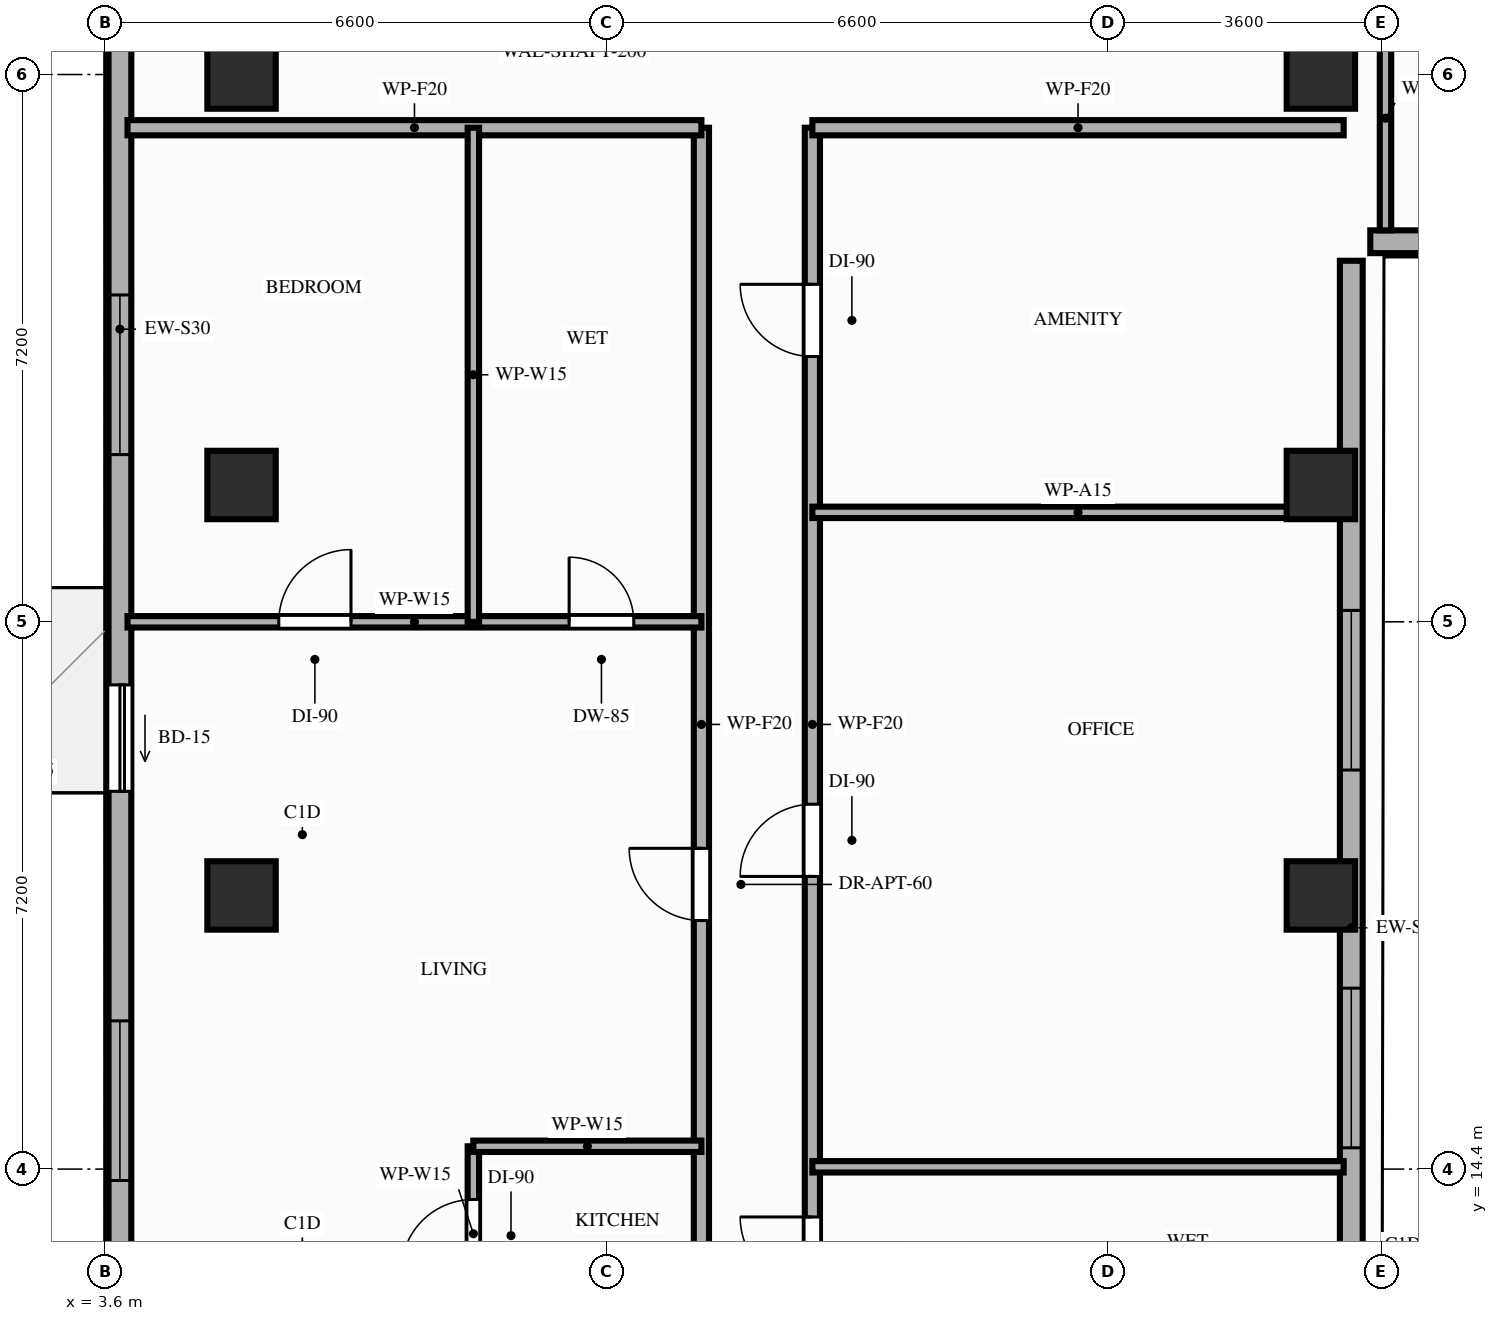
"""IFC4 building model, lengths in metres.
Left out: names, types, materials, properties, quantities, classifications, styles, units other than length and angle.
Written with IfcOpenShell. Run it as: python <this file> out.ifc"""

import sys

from ifc_helpers import new_model, si_unit, direction, frame, frame_2d, origin, origin_2d, place, context, subcontext, project, spatial, rectangle, extrude, element, fill, save


model = new_model("IFC4")
c1 = context("Model", 3, precision=1e-05, world=origin(), true_north=direction((0.0, 1.0)))
c2 = subcontext(c1, "Body", "Model", "MODEL_VIEW")
j1 = project(units=[si_unit("LENGTHUNIT", "METRE"), si_unit("PLANEANGLEUNIT", "RADIAN")], contexts=[c1])
p1 = place(None, origin())
s1 = spatial("IfcSite", under=j1, at=p1, CompositionType="ELEMENT")
p2 = place(p1, origin())
s2 = spatial("IfcBuilding", under=s1, at=p2, CompositionType="ELEMENT")
p3 = place(p2, frame((0.0, 0.0, 185.6)))
s3 = spatial("IfcBuildingStorey", under=s2, at=p3, CompositionType="ELEMENT", Elevation=185.6)
for number, where, z_axis, x_axis in (
    (1, (5.4, 18.0, 0.0), (0.0, 0.0, 1.0), (1.0, 0.0, 0.0)),
    (2, (19.6, 18.0, 0.0), (0.0, 0.0, 1.0), (1.0, 0.0, 0.0)),
    (3, (5.4, 23.4, 0.0), (0.0, 0.0, 1.0), (1.0, 0.0, 0.0)),
    (4, (19.6, 23.4, 0.0), (0.0, 0.0, 1.0), (1.0, 0.0, 0.0)),
    (5, (5.4, 28.8, 0.0), (0.0, 0.0, 1.0), (1.0, 0.0, 0.0)),
    (6, (19.6, 28.8, 0.0), (0.0, 0.0, 1.0), (1.0, 0.0, 0.0)),
):
    element("IfcColumn", number, at=place(p3, frame(where, z_axis=z_axis, x_axis=x_axis)), inside=s3, PredefinedType="COLUMN", context=c2, shape_type="SweptSolid", body=[
        extrude(rectangle(XDim=0.9, YDim=0.9, at=origin_2d()), origin(), (0.0, 0.0, 1.0), 3.2),
    ])
p4 = place(p3, frame((3.8, 42.1, 0.0), z_axis=(0.0, 0.0, 1.0), x_axis=(0.0, -1.0, 0.0)))
e7 = element("IfcWall", 7, at=p4, inside=s3, PredefinedType="STANDARD", context=c2, shape_type="SweptSolid", body=[
    extrude(rectangle(XDim=33.3, YDim=0.3, at=frame_2d((16.65, 0.0))), origin(), (0.0, 0.0, 1.0), 2.71),
])
p5 = place(p4, frame((21.33, 0.0, 0.0)))
e8 = element("IfcOpeningElement", 8, at=p5, cuts=e7, PredefinedType="OPENING", context=c2, shape_type="SweptSolid", body=[
    extrude(rectangle(XDim=1.4, YDim=2.1, at=frame_2d((0.7, 1.05))), frame((0.0, 0.16, 0.0), z_axis=(0.0, -1.0, 0.0), x_axis=(1.0, 0.0, 0.0)), (0.0, 0.0, 1.0), 0.32),
])
p6 = place(p4, frame((16.2, 0.0, 0.85)))
e9 = element("IfcOpeningElement", 9, at=p6, cuts=e7, PredefinedType="OPENING", context=c2, shape_type="SweptSolid", body=[
    extrude(rectangle(XDim=2.1, YDim=1.61, at=frame_2d((1.05, 0.805))), frame((0.0, 0.16, 0.0), z_axis=(0.0, -1.0, 0.0), x_axis=(1.0, 0.0, 0.0)), (0.0, 0.0, 1.0), 0.32),
])
p7 = place(p4, frame((30.65, 0.0, 0.85)))
e10 = element("IfcOpeningElement", 10, at=p7, cuts=e7, PredefinedType="OPENING", context=c2, shape_type="SweptSolid", body=[
    extrude(rectangle(XDim=2.1, YDim=1.61, at=frame_2d((1.05, 0.805))), frame((0.0, 0.16, 0.0), z_axis=(0.0, -1.0, 0.0), x_axis=(1.0, 0.0, 0.0)), (0.0, 0.0, 1.0), 0.32),
])
p8 = place(p4, frame((25.75, 0.0, 0.85)))
e11 = element("IfcOpeningElement", 11, at=p8, cuts=e7, PredefinedType="OPENING", context=c2, shape_type="SweptSolid", body=[
    extrude(rectangle(XDim=2.1, YDim=1.61, at=frame_2d((1.05, 0.805))), frame((0.0, 0.16, 0.0), z_axis=(0.0, -1.0, 0.0), x_axis=(1.0, 0.0, 0.0)), (0.0, 0.0, 1.0), 0.32),
])
p9 = place(p4, frame((9.75, 0.0, 0.85)))
e12 = element("IfcOpeningElement", 12, at=p9, cuts=e7, PredefinedType="OPENING", context=c2, shape_type="SweptSolid", body=[
    extrude(rectangle(XDim=2.1, YDim=1.61, at=frame_2d((1.05, 0.805))), frame((0.0, 0.16, 0.0), z_axis=(0.0, -1.0, 0.0), x_axis=(1.0, 0.0, 0.0)), (0.0, 0.0, 1.0), 0.32),
])
p10 = place(p4, frame((3.65, 0.0, 0.85)))
e13 = element("IfcOpeningElement", 13, at=p10, cuts=e7, PredefinedType="OPENING", context=c2, shape_type="SweptSolid", body=[
    extrude(rectangle(XDim=2.1, YDim=1.61, at=frame_2d((1.05, 0.805))), frame((0.0, 0.16, 0.0), z_axis=(0.0, -1.0, 0.0), x_axis=(1.0, 0.0, 0.0)), (0.0, 0.0, 1.0), 0.32),
])
p11 = place(p3, frame((20.0, 8.8, 0.0), z_axis=(0.0, 0.0, 1.0), x_axis=(0.0, 1.0, 0.0)))
e14 = element("IfcWall", 14, at=p11, inside=s3, PredefinedType="STANDARD", context=c2, shape_type="SweptSolid", body=[
    extrude(rectangle(XDim=17.55, YDim=0.3, at=frame_2d((8.775, 0.0))), origin(), (0.0, 0.0, 1.0), 2.45),
])
p12 = place(p11, frame((1.84, 0.0, 0.85)))
e15 = element("IfcOpeningElement", 15, at=p12, cuts=e14, PredefinedType="OPENING", context=c2, shape_type="SweptSolid", body=[
    extrude(rectangle(XDim=1.1, YDim=1.35, at=frame_2d((0.55, 0.675))), frame((0.0, 0.16, 0.0), z_axis=(0.0, -1.0, 0.0), x_axis=(1.0, 0.0, 0.0)), (0.0, 0.0, 1.0), 0.32),
])
p13 = place(p11, frame((5.88, 0.0, 0.85)))
e16 = element("IfcOpeningElement", 16, at=p13, cuts=e14, PredefinedType="OPENING", context=c2, shape_type="SweptSolid", body=[
    extrude(rectangle(XDim=2.1, YDim=1.35, at=frame_2d((1.05, 0.675))), frame((0.0, 0.16, 0.0), z_axis=(0.0, -1.0, 0.0), x_axis=(1.0, 0.0, 0.0)), (0.0, 0.0, 1.0), 0.32),
])
p14 = place(p11, frame((10.85, 0.0, 0.85)))
e17 = element("IfcOpeningElement", 17, at=p14, cuts=e14, PredefinedType="OPENING", context=c2, shape_type="SweptSolid", body=[
    extrude(rectangle(XDim=2.1, YDim=1.35, at=frame_2d((1.05, 0.675))), frame((0.0, 0.16, 0.0), z_axis=(0.0, -1.0, 0.0), x_axis=(1.0, 0.0, 0.0)), (0.0, 0.0, 1.0), 0.32),
])
p15 = place(p3, frame((20.25, 26.6, 0.0), z_axis=(0.0, 0.0, 1.0), x_axis=(1.0, 0.0, 0.0)))
e18 = element("IfcWall", 18, at=p15, inside=s3, PredefinedType="STANDARD", context=c2, shape_type="SweptSolid", body=[
    extrude(rectangle(XDim=21.35, YDim=0.3, at=frame_2d((10.675, 0.0))), origin(), (0.0, 0.0, 1.0), 2.71),
])
p16 = place(p15, frame((7.95, 0.0, 0.0)))
e19 = element("IfcOpeningElement", 19, at=p16, cuts=e18, PredefinedType="OPENING", context=c2, shape_type="SweptSolid", body=[
    extrude(rectangle(XDim=1.4, YDim=2.1, at=frame_2d((0.7, 1.05))), frame((0.0, 0.16, 0.0), z_axis=(0.0, -1.0, 0.0), x_axis=(1.0, 0.0, 0.0)), (0.0, 0.0, 1.0), 0.32),
])
p17 = place(p15, frame((16.13, 0.0, 0.85)))
e20 = element("IfcOpeningElement", 20, at=p17, cuts=e18, PredefinedType="OPENING", context=c2, shape_type="SweptSolid", body=[
    extrude(rectangle(XDim=2.1, YDim=1.61, at=frame_2d((1.05, 0.805))), frame((0.0, 0.16, 0.0), z_axis=(0.0, -1.0, 0.0), x_axis=(1.0, 0.0, 0.0)), (0.0, 0.0, 1.0), 0.32),
])
p18 = place(p15, frame((2.1, 0.0, 0.85)))
e21 = element("IfcOpeningElement", 21, at=p18, cuts=e18, PredefinedType="OPENING", context=c2, shape_type="SweptSolid", body=[
    extrude(rectangle(XDim=2.1, YDim=1.61, at=frame_2d((1.05, 0.805))), frame((0.0, 0.16, 0.0), z_axis=(0.0, -1.0, 0.0), x_axis=(1.0, 0.0, 0.0)), (0.0, 0.0, 1.0), 0.32),
])
p19 = place(p15, frame((13.5, 0.0, 0.85)))
e22 = element("IfcOpeningElement", 22, at=p19, cuts=e18, PredefinedType="OPENING", context=c2, shape_type="SweptSolid", body=[
    extrude(rectangle(XDim=2.1, YDim=1.61, at=frame_2d((1.05, 0.805))), frame((0.0, 0.16, 0.0), z_axis=(0.0, -1.0, 0.0), x_axis=(1.0, 0.0, 0.0)), (0.0, 0.0, 1.0), 0.32),
])
p20 = place(p3, frame((11.45, 12.4, 0.0), z_axis=(0.0, 0.0, 1.0), x_axis=(0.0, 1.0, 0.0)))
e23 = element("IfcWall", 23, at=p20, inside=s3, PredefinedType="PARTITIONING", context=c2, shape_type="SweptSolid", body=[
    extrude(rectangle(XDim=15.7, YDim=0.2, at=frame_2d((7.85, 0.0))), origin(), (0.0, 0.0, 1.0), 2.45),
])
p21 = place(p20, frame((5.27, 0.0, 0.0)))
e24 = element("IfcOpeningElement", 24, at=p21, cuts=e23, PredefinedType="OPENING", context=c2, shape_type="SweptSolid", body=[
    extrude(rectangle(XDim=0.95, YDim=2.15, at=frame_2d((0.475, 1.075))), frame((0.0, 0.11, 0.0), z_axis=(0.0, -1.0, 0.0), x_axis=(1.0, 0.0, 0.0)), (0.0, 0.0, 1.0), 0.22),
])
p22 = place(p3, frame((12.91, 12.4, 0.0), z_axis=(0.0, 0.0, 1.0), x_axis=(0.0, 1.0, 0.0)))
e25 = element("IfcWall", 25, at=p22, inside=s3, PredefinedType="PARTITIONING", context=c2, shape_type="SweptSolid", body=[
    extrude(rectangle(XDim=15.7, YDim=0.2, at=frame_2d((7.85, 0.0))), origin(), (0.0, 0.0, 1.0), 2.45),
])
p23 = place(p22, frame((0.42, 0.0, 0.0)))
e26 = element("IfcOpeningElement", 26, at=p23, cuts=e25, PredefinedType="OPENING", context=c2, shape_type="SweptSolid", body=[
    extrude(rectangle(XDim=0.95, YDim=2.1, at=frame_2d((0.475, 1.05))), frame((0.0, 0.11, 0.0), z_axis=(0.0, -1.0, 0.0), x_axis=(1.0, 0.0, 0.0)), (0.0, 0.0, 1.0), 0.22),
])
p24 = place(p22, frame((5.85, 0.0, 0.0)))
e27 = element("IfcOpeningElement", 27, at=p24, cuts=e25, PredefinedType="OPENING", context=c2, shape_type="SweptSolid", body=[
    extrude(rectangle(XDim=0.95, YDim=2.15, at=frame_2d((0.475, 1.075))), frame((0.0, 0.11, 0.0), z_axis=(0.0, -1.0, 0.0), x_axis=(1.0, 0.0, 0.0)), (0.0, 0.0, 1.0), 0.22),
])
p25 = place(p22, frame((12.69, 0.0, 0.0)))
e28 = element("IfcOpeningElement", 28, at=p25, cuts=e25, PredefinedType="OPENING", context=c2, shape_type="SweptSolid", body=[
    extrude(rectangle(XDim=0.95, YDim=2.15, at=frame_2d((0.475, 1.075))), frame((0.0, 0.11, 0.0), z_axis=(0.0, -1.0, 0.0), x_axis=(1.0, 0.0, 0.0)), (0.0, 0.0, 1.0), 0.22),
])
p26 = place(p3, frame((3.9, 28.1, 0.0), z_axis=(0.0, 0.0, 1.0), x_axis=(1.0, 0.0, 0.0)))
e29 = element("IfcWall", 29, at=p26, inside=s3, PredefinedType="PARTITIONING", context=c2, shape_type="SweptSolid", body=[
    extrude(rectangle(XDim=7.55, YDim=0.2, at=frame_2d((3.775, 0.0))), origin(), (0.0, 0.0, 1.0), 2.45),
])
p27 = place(p3, frame((12.91, 28.1, 0.0), z_axis=(0.0, 0.0, 1.0), x_axis=(1.0, 0.0, 0.0)))
e30 = element("IfcWall", 30, at=p27, inside=s3, PredefinedType="PARTITIONING", context=c2, shape_type="SweptSolid", body=[
    extrude(rectangle(XDim=6.99, YDim=0.2, at=frame_2d((3.495, 0.0))), origin(), (0.0, 0.0, 1.0), 2.45),
])
p28 = place(p3, frame((20.45, 26.75, 0.0), z_axis=(0.0, 0.0, 1.0), x_axis=(0.0, 1.0, 0.0)))
e31 = element("IfcWall", 31, at=p28, inside=s3, PredefinedType="PARTITIONING", context=c2, shape_type="SweptSolid", body=[
    extrude(rectangle(XDim=2.95, YDim=0.15, at=frame_2d((1.475, 0.0))), origin(), (0.0, 0.0, 1.0), 2.45),
])
p29 = place(p3, frame((3.9, 21.6, 0.0), z_axis=(0.0, 0.0, 1.0), x_axis=(1.0, 0.0, 0.0)))
e32 = element("IfcWall", 32, at=p29, inside=s3, PredefinedType="PARTITIONING", context=c2, shape_type="SweptSolid", body=[
    extrude(rectangle(XDim=7.55, YDim=0.15, at=frame_2d((3.775, 0.0))), origin(), (0.0, 0.0, 1.0), 2.45),
])
p30 = place(p29, frame((1.99, 0.0, 0.0)))
e33 = element("IfcOpeningElement", 33, at=p30, cuts=e32, PredefinedType="OPENING", context=c2, shape_type="SweptSolid", body=[
    extrude(rectangle(XDim=0.95, YDim=2.15, at=frame_2d((0.475, 1.075))), frame((0.0, 0.085, 0.0), z_axis=(0.0, -1.0, 0.0), x_axis=(1.0, 0.0, 0.0)), (0.0, 0.0, 1.0), 0.17),
])
p31 = place(p29, frame((5.81, 0.0, 0.0)))
e34 = element("IfcOpeningElement", 34, at=p31, cuts=e32, PredefinedType="OPENING", context=c2, shape_type="SweptSolid", body=[
    extrude(rectangle(XDim=0.85, YDim=2.1, at=frame_2d((0.425, 1.05))), frame((0.0, 0.085, 0.0), z_axis=(0.0, -1.0, 0.0), x_axis=(1.0, 0.0, 0.0)), (0.0, 0.0, 1.0), 0.17),
])
p32 = place(p3, frame((8.45, 21.6, 0.0), z_axis=(0.0, 0.0, 1.0), x_axis=(0.0, 1.0, 0.0)))
e35 = element("IfcWall", 35, at=p32, inside=s3, PredefinedType="PARTITIONING", context=c2, shape_type="SweptSolid", body=[
    extrude(rectangle(XDim=6.5, YDim=0.15, at=frame_2d((3.25, 0.0))), origin(), (0.0, 0.0, 1.0), 2.45),
])
p33 = place(p3, frame((8.45, 12.4, 0.0), z_axis=(0.0, 0.0, 1.0), x_axis=(0.0, 1.0, 0.0)))
e36 = element("IfcWall", 36, at=p33, inside=s3, PredefinedType="PARTITIONING", context=c2, shape_type="SweptSolid", body=[
    extrude(rectangle(XDim=2.3, YDim=0.15, at=frame_2d((1.15, 0.0))), origin(), (0.0, 0.0, 1.0), 2.45),
])
p34 = place(p33, frame((0.65, 0.0, 0.0)))
e37 = element("IfcOpeningElement", 37, at=p34, cuts=e36, PredefinedType="OPENING", context=c2, shape_type="SweptSolid", body=[
    extrude(rectangle(XDim=0.95, YDim=2.15, at=frame_2d((0.475, 1.075))), frame((0.0, 0.085, 0.0), z_axis=(0.0, -1.0, 0.0), x_axis=(1.0, 0.0, 0.0)), (0.0, 0.0, 1.0), 0.17),
])
p35 = place(p3, frame((8.45, 14.7, 0.0), z_axis=(0.0, 0.0, 1.0), x_axis=(1.0, 0.0, 0.0)))
e38 = element("IfcWall", 38, at=p35, inside=s3, PredefinedType="PARTITIONING", context=c2, shape_type="SweptSolid", body=[
    extrude(rectangle(XDim=3.0, YDim=0.15, at=frame_2d((1.5, 0.0))), origin(), (0.0, 0.0, 1.0), 3.02),
])
for number, where, z_axis, x_axis in (
    (39, (12.91, 14.43, 0.0), (0.0, 0.0, 1.0), (1.0, 0.0, 0.0)),
    (40, (12.91, 23.04, 0.0), (0.0, 0.0, 1.0), (1.0, 0.0, 0.0)),
):
    element("IfcWall", number, at=place(p3, frame(where, z_axis=z_axis, x_axis=x_axis)), inside=s3, PredefinedType="PARTITIONING", context=c2, shape_type="SweptSolid", body=[
        extrude(rectangle(XDim=6.99, YDim=0.15, at=frame_2d((3.495, 0.0))), origin(), (0.0, 0.0, 1.0), 2.45),
    ])
p36 = place(p5, origin())
e41 = element("IfcDoor", 41, at=p36, inside=s3, OperationType="SLIDING_TO_RIGHT", PredefinedType="DOOR", context=c2, shape_type="SweptSolid", body=[
    extrude(rectangle(XDim=1.4, YDim=2.1, at=frame_2d((0.7, 1.05))), frame((0.0, 0.025, 0.0), z_axis=(0.0, -1.0, 0.0), x_axis=(1.0, 0.0, 0.0)), (0.0, 0.0, 1.0), 0.05),
])
fill(e8, e41)
p37 = place(p6, origin())
e42 = element("IfcWindow", 42, at=p37, inside=s3, PartitioningType="SINGLE_PANEL", PredefinedType="WINDOW", context=c2, shape_type="SweptSolid", body=[
    extrude(rectangle(XDim=2.1, YDim=1.61, at=frame_2d((1.05, 0.805))), frame((0.0, 0.03, 0.0), z_axis=(0.0, -1.0, 0.0), x_axis=(1.0, 0.0, 0.0)), (0.0, 0.0, 1.0), 0.06),
])
fill(e9, e42)
p38 = place(p8, origin())
e43 = element("IfcWindow", 43, at=p38, inside=s3, PartitioningType="SINGLE_PANEL", PredefinedType="WINDOW", context=c2, shape_type="SweptSolid", body=[
    extrude(rectangle(XDim=2.1, YDim=1.61, at=frame_2d((1.05, 0.805))), frame((0.0, 0.03, 0.0), z_axis=(0.0, -1.0, 0.0), x_axis=(1.0, 0.0, 0.0)), (0.0, 0.0, 1.0), 0.06),
])
fill(e11, e43)
p39 = place(p13, origin())
e44 = element("IfcWindow", 44, at=p39, inside=s3, PartitioningType="SINGLE_PANEL", PredefinedType="WINDOW", context=c2, shape_type="SweptSolid", body=[
    extrude(rectangle(XDim=2.1, YDim=1.35, at=frame_2d((1.05, 0.675))), frame((0.0, 0.03, 0.0), z_axis=(0.0, -1.0, 0.0), x_axis=(1.0, 0.0, 0.0)), (0.0, 0.0, 1.0), 0.06),
])
fill(e16, e44)
p40 = place(p14, origin())
e45 = element("IfcWindow", 45, at=p40, inside=s3, PartitioningType="SINGLE_PANEL", PredefinedType="WINDOW", context=c2, shape_type="SweptSolid", body=[
    extrude(rectangle(XDim=2.1, YDim=1.35, at=frame_2d((1.05, 0.675))), frame((0.0, 0.03, 0.0), z_axis=(0.0, -1.0, 0.0), x_axis=(1.0, 0.0, 0.0)), (0.0, 0.0, 1.0), 0.06),
])
fill(e17, e45)
p41 = place(p21, origin())
e46 = element("IfcDoor", 46, at=p41, inside=s3, OperationType="SINGLE_SWING_RIGHT", PredefinedType="DOOR", context=c2, shape_type="SweptSolid", body=[
    extrude(rectangle(XDim=0.95, YDim=2.15, at=frame_2d((0.475, 1.075))), frame((0.0, 0.025, 0.0), z_axis=(0.0, -1.0, 0.0), x_axis=(1.0, 0.0, 0.0)), (0.0, 0.0, 1.0), 0.05),
])
fill(e24, e46)
p42 = place(p34, origin())
e47 = element("IfcDoor", 47, at=p42, inside=s3, OperationType="SINGLE_SWING_LEFT", PredefinedType="DOOR", context=c2, shape_type="SweptSolid", body=[
    extrude(rectangle(XDim=0.95, YDim=2.15, at=frame_2d((0.475, 1.075))), frame((0.0, 0.025, 0.0), z_axis=(0.0, -1.0, 0.0), x_axis=(1.0, 0.0, 0.0)), (0.0, 0.0, 1.0), 0.05),
])
fill(e37, e47)
p43 = place(p30, origin())
e48 = element("IfcDoor", 48, at=p43, inside=s3, OperationType="SINGLE_SWING_RIGHT", PredefinedType="DOOR", context=c2, shape_type="SweptSolid", body=[
    extrude(rectangle(XDim=0.95, YDim=2.15, at=frame_2d((0.475, 1.075))), frame((0.0, 0.025, 0.0), z_axis=(0.0, -1.0, 0.0), x_axis=(1.0, 0.0, 0.0)), (0.0, 0.0, 1.0), 0.05),
])
fill(e33, e48)
p44 = place(p31, origin())
e49 = element("IfcDoor", 49, at=p44, inside=s3, OperationType="SINGLE_SWING_LEFT", PredefinedType="DOOR", context=c2, shape_type="SweptSolid", body=[
    extrude(rectangle(XDim=0.85, YDim=2.1, at=frame_2d((0.425, 1.05))), frame((0.0, 0.025, 0.0), z_axis=(0.0, -1.0, 0.0), x_axis=(1.0, 0.0, 0.0)), (0.0, 0.0, 1.0), 0.05),
])
fill(e34, e49)
p45 = place(p23, origin())
e50 = element("IfcDoor", 50, at=p45, inside=s3, OperationType="SINGLE_SWING_RIGHT", PredefinedType="DOOR", context=c2, shape_type="SweptSolid", body=[
    extrude(rectangle(XDim=0.95, YDim=2.1, at=frame_2d((0.475, 1.05))), frame((0.0, 0.025, 0.0), z_axis=(0.0, -1.0, 0.0), x_axis=(1.0, 0.0, 0.0)), (0.0, 0.0, 1.0), 0.05),
])
fill(e26, e50)
p46 = place(p24, origin())
e51 = element("IfcDoor", 51, at=p46, inside=s3, OperationType="SINGLE_SWING_LEFT", PredefinedType="DOOR", context=c2, shape_type="SweptSolid", body=[
    extrude(rectangle(XDim=0.95, YDim=2.15, at=frame_2d((0.475, 1.075))), frame((0.0, 0.025, 0.0), z_axis=(0.0, -1.0, 0.0), x_axis=(1.0, 0.0, 0.0)), (0.0, 0.0, 1.0), 0.05),
])
fill(e27, e51)
p47 = place(p25, origin())
e52 = element("IfcDoor", 52, at=p47, inside=s3, OperationType="SINGLE_SWING_RIGHT", PredefinedType="DOOR", context=c2, shape_type="SweptSolid", body=[
    extrude(rectangle(XDim=0.95, YDim=2.15, at=frame_2d((0.475, 1.075))), frame((0.0, 0.025, 0.0), z_axis=(0.0, -1.0, 0.0), x_axis=(1.0, 0.0, 0.0)), (0.0, 0.0, 1.0), 0.05),
])
fill(e28, e52)
save(model, sys.argv[1])
